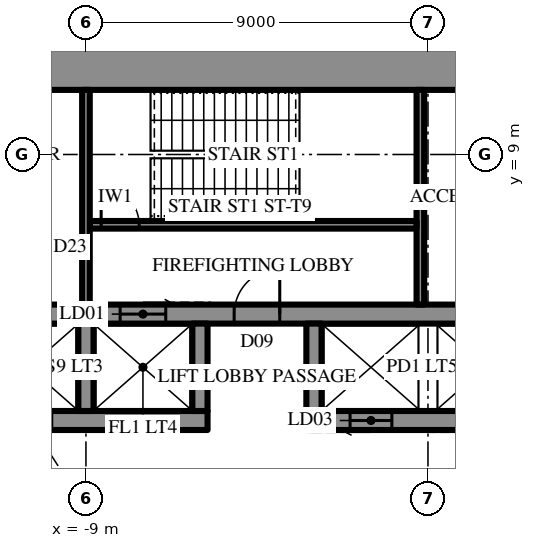
"""IFC4 building model, lengths in metres.
Left out: names, types, materials, properties, quantities, classifications, styles, units other than length and angle.
Written with IfcOpenShell. Run it as: python <this file> out.ifc"""

import sys

from ifc_helpers import new_model, si_unit, direction, frame, frame_2d, origin, place, context, subcontext, project, spatial, rectangle, extrude, element, fill, save


model = new_model("IFC4")
c1 = context("Model", 3, precision=1e-05, world=origin(), true_north=direction((0.0, 1.0)))
c2 = subcontext(c1, "Body", "Model", "MODEL_VIEW")
j1 = project(units=[si_unit("LENGTHUNIT", "METRE"), si_unit("PLANEANGLEUNIT", "RADIAN")], contexts=[c1])
p1 = place(None, origin())
s1 = spatial("IfcSite", under=j1, at=p1, CompositionType="ELEMENT")
p2 = place(p1, origin())
s2 = spatial("IfcBuilding", under=s1, at=p2, CompositionType="ELEMENT")
p3 = place(p2, frame((0.0, 0.0, 306.5)))
s3 = spatial("IfcBuildingStorey", under=s2, at=p3, CompositionType="ELEMENT", Elevation=306.5)
p4 = place(p3, frame((-15.5, 11.5, 0.0), z_axis=(0.0, 0.0, 1.0), x_axis=(1.0, 0.0, 0.0)))
e1 = element("IfcWall", 1, at=p4, inside=s3, PredefinedType="SHEAR", context=c2, shape_type="SweptSolid", body=[
    extrude(rectangle(XDim=31.0, YDim=1.6, at=frame_2d((15.5, 0.0))), origin(), (0.0, 0.0, 1.0), 5.0),
])
p5 = place(p4, frame((16.35, 0.0, 0.0)))
e2 = element("IfcOpeningElement", 2, at=p5, cuts=e1, PredefinedType="OPENING", context=c2, shape_type="SweptSolid", body=[
    extrude(rectangle(XDim=0.9, YDim=2.2, at=frame_2d((0.45, 1.1))), frame((0.0, 0.81, 0.0), z_axis=(0.0, -1.0, 0.0), x_axis=(1.0, 0.0, 0.0)), (0.0, 0.0, 1.0), 1.62),
])
p6 = place(p4, frame((19.35, 0.0, 0.0)))
e3 = element("IfcOpeningElement", 3, at=p6, cuts=e1, PredefinedType="OPENING", context=c2, shape_type="SweptSolid", body=[
    extrude(rectangle(XDim=0.9, YDim=2.2, at=frame_2d((0.45, 1.1))), frame((0.0, 0.81, 0.0), z_axis=(0.0, -1.0, 0.0), x_axis=(1.0, 0.0, 0.0)), (0.0, 0.0, 1.0), 1.62),
])
p7 = place(p4, frame((22.4, 0.0, 0.0)))
e4 = element("IfcOpeningElement", 4, at=p7, cuts=e1, PredefinedType="OPENING", context=c2, shape_type="SweptSolid", body=[
    extrude(rectangle(XDim=1.0, YDim=2.2, at=frame_2d((0.5, 1.1))), frame((0.0, 0.81, 0.0), z_axis=(0.0, -1.0, 0.0), x_axis=(1.0, 0.0, 0.0)), (0.0, 0.0, 1.0), 1.62),
])
p8 = place(p4, frame((1.65, 0.0, 0.0)))
e5 = element("IfcOpeningElement", 5, at=p8, cuts=e1, PredefinedType="OPENING", context=c2, shape_type="SweptSolid", body=[
    extrude(rectangle(XDim=0.9, YDim=2.2, at=frame_2d((0.45, 1.1))), frame((0.0, 0.81, 0.0), z_axis=(0.0, -1.0, 0.0), x_axis=(1.0, 0.0, 0.0)), (0.0, 0.0, 1.0), 1.62),
])
p9 = place(p4, frame((4.65, 0.0, 0.0)))
e6 = element("IfcOpeningElement", 6, at=p9, cuts=e1, PredefinedType="OPENING", context=c2, shape_type="SweptSolid", body=[
    extrude(rectangle(XDim=0.9, YDim=2.2, at=frame_2d((0.45, 1.1))), frame((0.0, 0.81, 0.0), z_axis=(0.0, -1.0, 0.0), x_axis=(1.0, 0.0, 0.0)), (0.0, 0.0, 1.0), 1.62),
])
p10 = place(p4, frame((25.45, 0.0, 0.0)))
e7 = element("IfcOpeningElement", 7, at=p10, cuts=e1, PredefinedType="OPENING", context=c2, shape_type="SweptSolid", body=[
    extrude(rectangle(XDim=0.9, YDim=2.2, at=frame_2d((0.45, 1.1))), frame((0.0, 0.81, 0.0), z_axis=(0.0, -1.0, 0.0), x_axis=(1.0, 0.0, 0.0)), (0.0, 0.0, 1.0), 1.62),
])
p11 = place(p4, frame((28.45, 0.0, 0.0)))
e8 = element("IfcOpeningElement", 8, at=p11, cuts=e1, PredefinedType="OPENING", context=c2, shape_type="SweptSolid", body=[
    extrude(rectangle(XDim=0.9, YDim=2.2, at=frame_2d((0.45, 1.1))), frame((0.0, 0.81, 0.0), z_axis=(0.0, -1.0, 0.0), x_axis=(1.0, 0.0, 0.0)), (0.0, 0.0, 1.0), 1.62),
])
p12 = place(p3, frame((-11.7, 2.0, 0.0), z_axis=(0.0, 0.0, 1.0), x_axis=(1.0, 0.0, 0.0)))
e9 = element("IfcWall", 9, at=p12, inside=s3, PredefinedType="SHEAR", context=c2, shape_type="SweptSolid", body=[
    extrude(rectangle(XDim=5.9, YDim=0.5, at=frame_2d((2.95, 0.0))), origin(), (0.0, 0.0, 1.0), 5.0),
])
p13 = place(p12, frame((0.6, 0.0, 0.0)))
e10 = element("IfcOpeningElement", 10, at=p13, cuts=e9, PredefinedType="OPENING", context=c2, shape_type="SweptSolid", body=[
    extrude(rectangle(XDim=1.2, YDim=2.2, at=frame_2d((0.6, 1.1))), frame((0.0, 0.26, 0.0), z_axis=(0.0, -1.0, 0.0), x_axis=(1.0, 0.0, 0.0)), (0.0, 0.0, 1.0), 0.52),
])
p14 = place(p3, frame((-3.2, 2.0, 0.0), z_axis=(0.0, 0.0, 1.0), x_axis=(1.0, 0.0, 0.0)))
e11 = element("IfcWall", 11, at=p14, inside=s3, PredefinedType="SHEAR", context=c2, shape_type="SweptSolid", body=[
    extrude(rectangle(XDim=14.9, YDim=0.5, at=frame_2d((7.45, 0.0))), origin(), (0.0, 0.0, 1.0), 5.0),
])
p15 = place(p14, frame((1.15, 0.0, 0.0)))
e12 = element("IfcOpeningElement", 12, at=p15, cuts=e11, PredefinedType="OPENING", context=c2, shape_type="SweptSolid", body=[
    extrude(rectangle(XDim=1.1, YDim=2.2, at=frame_2d((0.55, 1.1))), frame((0.0, 0.26, 0.0), z_axis=(0.0, -1.0, 0.0), x_axis=(1.0, 0.0, 0.0)), (0.0, 0.0, 1.0), 0.52),
])
p16 = place(p14, frame((4.15, 0.0, 0.0)))
e13 = element("IfcOpeningElement", 13, at=p16, cuts=e11, PredefinedType="OPENING", context=c2, shape_type="SweptSolid", body=[
    extrude(rectangle(XDim=1.1, YDim=2.2, at=frame_2d((0.55, 1.1))), frame((0.0, 0.26, 0.0), z_axis=(0.0, -1.0, 0.0), x_axis=(1.0, 0.0, 0.0)), (0.0, 0.0, 1.0), 0.52),
])
p17 = place(p14, frame((7.15, 0.0, 0.0)))
e14 = element("IfcOpeningElement", 14, at=p17, cuts=e11, PredefinedType="OPENING", context=c2, shape_type="SweptSolid", body=[
    extrude(rectangle(XDim=1.1, YDim=2.2, at=frame_2d((0.55, 1.1))), frame((0.0, 0.26, 0.0), z_axis=(0.0, -1.0, 0.0), x_axis=(1.0, 0.0, 0.0)), (0.0, 0.0, 1.0), 0.52),
])
p18 = place(p14, frame((10.15, 0.0, 0.0)))
e15 = element("IfcOpeningElement", 15, at=p18, cuts=e11, PredefinedType="OPENING", context=c2, shape_type="SweptSolid", body=[
    extrude(rectangle(XDim=1.1, YDim=2.2, at=frame_2d((0.55, 1.1))), frame((0.0, 0.26, 0.0), z_axis=(0.0, -1.0, 0.0), x_axis=(1.0, 0.0, 0.0)), (0.0, 0.0, 1.0), 0.52),
])
p19 = place(p14, frame((13.1, 0.0, 0.0)))
e16 = element("IfcOpeningElement", 16, at=p19, cuts=e11, PredefinedType="OPENING", context=c2, shape_type="SweptSolid", body=[
    extrude(rectangle(XDim=1.2, YDim=2.2, at=frame_2d((0.6, 1.1))), frame((0.0, 0.26, 0.0), z_axis=(0.0, -1.0, 0.0), x_axis=(1.0, 0.0, 0.0)), (0.0, 0.0, 1.0), 0.52),
])
p20 = place(p3, frame((-11.7, 4.8, 0.0), z_axis=(0.0, 0.0, 1.0), x_axis=(1.0, 0.0, 0.0)))
e17 = element("IfcWall", 17, at=p20, inside=s3, PredefinedType="SHEAR", context=c2, shape_type="SweptSolid", body=[
    extrude(rectangle(XDim=23.4, YDim=0.5, at=frame_2d((11.7, 0.0))), origin(), (0.0, 0.0, 1.0), 5.0),
])
p21 = place(p20, frame((6.6, 0.0, 0.0)))
e18 = element("IfcOpeningElement", 18, at=p21, cuts=e17, PredefinedType="OPENING", context=c2, shape_type="SweptSolid", body=[
    extrude(rectangle(XDim=1.2, YDim=2.2, at=frame_2d((0.6, 1.1))), frame((0.0, 0.26, 0.0), z_axis=(0.0, -1.0, 0.0), x_axis=(1.0, 0.0, 0.0)), (0.0, 0.0, 1.0), 0.52),
])
p22 = place(p20, frame((3.6, 0.0, 0.0)))
e19 = element("IfcOpeningElement", 19, at=p22, cuts=e17, PredefinedType="OPENING", context=c2, shape_type="SweptSolid", body=[
    extrude(rectangle(XDim=1.2, YDim=2.2, at=frame_2d((0.6, 1.1))), frame((0.0, 0.26, 0.0), z_axis=(0.0, -1.0, 0.0), x_axis=(1.0, 0.0, 0.0)), (0.0, 0.0, 1.0), 0.52),
])
for number, where, z_axis, x_axis in (
    (20, (-9.0, 2.25, 0.0), (0.0, 0.0, 1.0), (0.0, 1.0, 0.0)),
    (21, (-6.0, 2.25, 0.0), (0.0, 0.0, 1.0), (0.0, 1.0, 0.0)),
    (22, (-3.0, 2.25, 0.0), (0.0, 0.0, 1.0), (0.0, 1.0, 0.0)),
):
    element("IfcWall", number, at=place(p3, frame(where, z_axis=z_axis, x_axis=x_axis)), inside=s3, PredefinedType="SHEAR", context=c2, shape_type="SweptSolid", body=[
        extrude(rectangle(XDim=2.3, YDim=0.4, at=frame_2d((1.15, 0.0))), origin(), (0.0, 0.0, 1.0), 5.0),
    ])
p23 = place(p3, frame((-0.2, 5.05, 0.0), z_axis=(0.0, 0.0, 1.0), x_axis=(0.0, 1.0, 0.0)))
e23 = element("IfcWall", 23, at=p23, inside=s3, PredefinedType="SHEAR", context=c2, shape_type="SweptSolid", body=[
    extrude(rectangle(XDim=5.65, YDim=0.2, at=frame_2d((2.825, 0.0))), origin(), (0.0, 0.0, 1.0), 5.0),
])
p24 = place(p3, frame((-8.9, 7.15, 0.0), z_axis=(0.0, 0.0, 1.0), x_axis=(1.0, 0.0, 0.0)))
e24 = element("IfcWall", 24, at=p24, inside=s3, PredefinedType="SHEAR", context=c2, shape_type="SweptSolid", body=[
    extrude(rectangle(XDim=8.6, YDim=0.2, at=frame_2d((4.3, 0.0))), origin(), (0.0, 0.0, 1.0), 5.0),
])
p25 = place(p24, frame((0.3, 0.0, 0.0)))
e25 = element("IfcOpeningElement", 25, at=p25, cuts=e24, PredefinedType="OPENING", context=c2, shape_type="SweptSolid", body=[
    extrude(rectangle(XDim=1.0, YDim=2.2, at=frame_2d((0.5, 1.1))), frame((0.0, 0.11, 0.0), z_axis=(0.0, -1.0, 0.0), x_axis=(1.0, 0.0, 0.0)), (0.0, 0.0, 1.0), 0.22),
])
p26 = place(p3, frame((-9.0, 5.05, 0.0), z_axis=(0.0, 0.0, 1.0), x_axis=(0.0, 1.0, 0.0)))
e26 = element("IfcWall", 26, at=p26, inside=s3, PredefinedType="PARTITIONING", context=c2, shape_type="SweptSolid", body=[
    extrude(rectangle(XDim=5.65, YDim=0.2, at=frame_2d((2.825, 0.0))), origin(), (0.0, 0.0, 1.0), 4.8),
])
p27 = place(p21, origin())
e27 = element("IfcDoor", 27, at=p27, inside=s3, OperationType="SINGLE_SWING_LEFT", PredefinedType="DOOR", context=c2, shape_type="SweptSolid", body=[
    extrude(rectangle(XDim=1.2, YDim=2.2, at=frame_2d((0.6, 1.1))), frame((0.0, 0.025, 0.0), z_axis=(0.0, -1.0, 0.0), x_axis=(1.0, 0.0, 0.0)), (0.0, 0.0, 1.0), 0.05),
])
fill(e18, e27)
p28 = place(p25, origin())
e28 = element("IfcDoor", 28, at=p28, inside=s3, OperationType="SINGLE_SWING_RIGHT", PredefinedType="DOOR", context=c2, shape_type="SweptSolid", body=[
    extrude(rectangle(XDim=1.0, YDim=2.2, at=frame_2d((0.5, 1.1))), frame((0.0, 0.025, 0.0), z_axis=(0.0, -1.0, 0.0), x_axis=(1.0, 0.0, 0.0)), (0.0, 0.0, 1.0), 0.05),
])
fill(e25, e28)
p29 = place(p22, origin())
e29 = element("IfcDoor", 29, at=p29, inside=s3, OperationType="SLIDING_TO_LEFT", PredefinedType="DOOR", context=c2, shape_type="SweptSolid", body=[
    extrude(rectangle(XDim=1.2, YDim=2.2, at=frame_2d((0.6, 1.1))), frame((0.0, 0.025, 0.0), z_axis=(0.0, -1.0, 0.0), x_axis=(1.0, 0.0, 0.0)), (0.0, 0.0, 1.0), 0.05),
])
fill(e19, e29)
p30 = place(p15, frame((1.1, 0.0, 0.0), z_axis=(0.0, 0.0, 1.0), x_axis=(-1.0, 0.0, 0.0)))
e30 = element("IfcDoor", 30, at=p30, inside=s3, OperationType="SLIDING_TO_LEFT", PredefinedType="DOOR", context=c2, shape_type="SweptSolid", body=[
    extrude(rectangle(XDim=1.1, YDim=2.2, at=frame_2d((0.55, 1.1))), frame((0.0, 0.025, 0.0), z_axis=(0.0, -1.0, 0.0), x_axis=(1.0, 0.0, 0.0)), (0.0, 0.0, 1.0), 0.05),
])
fill(e12, e30)
save(model, sys.argv[1])
